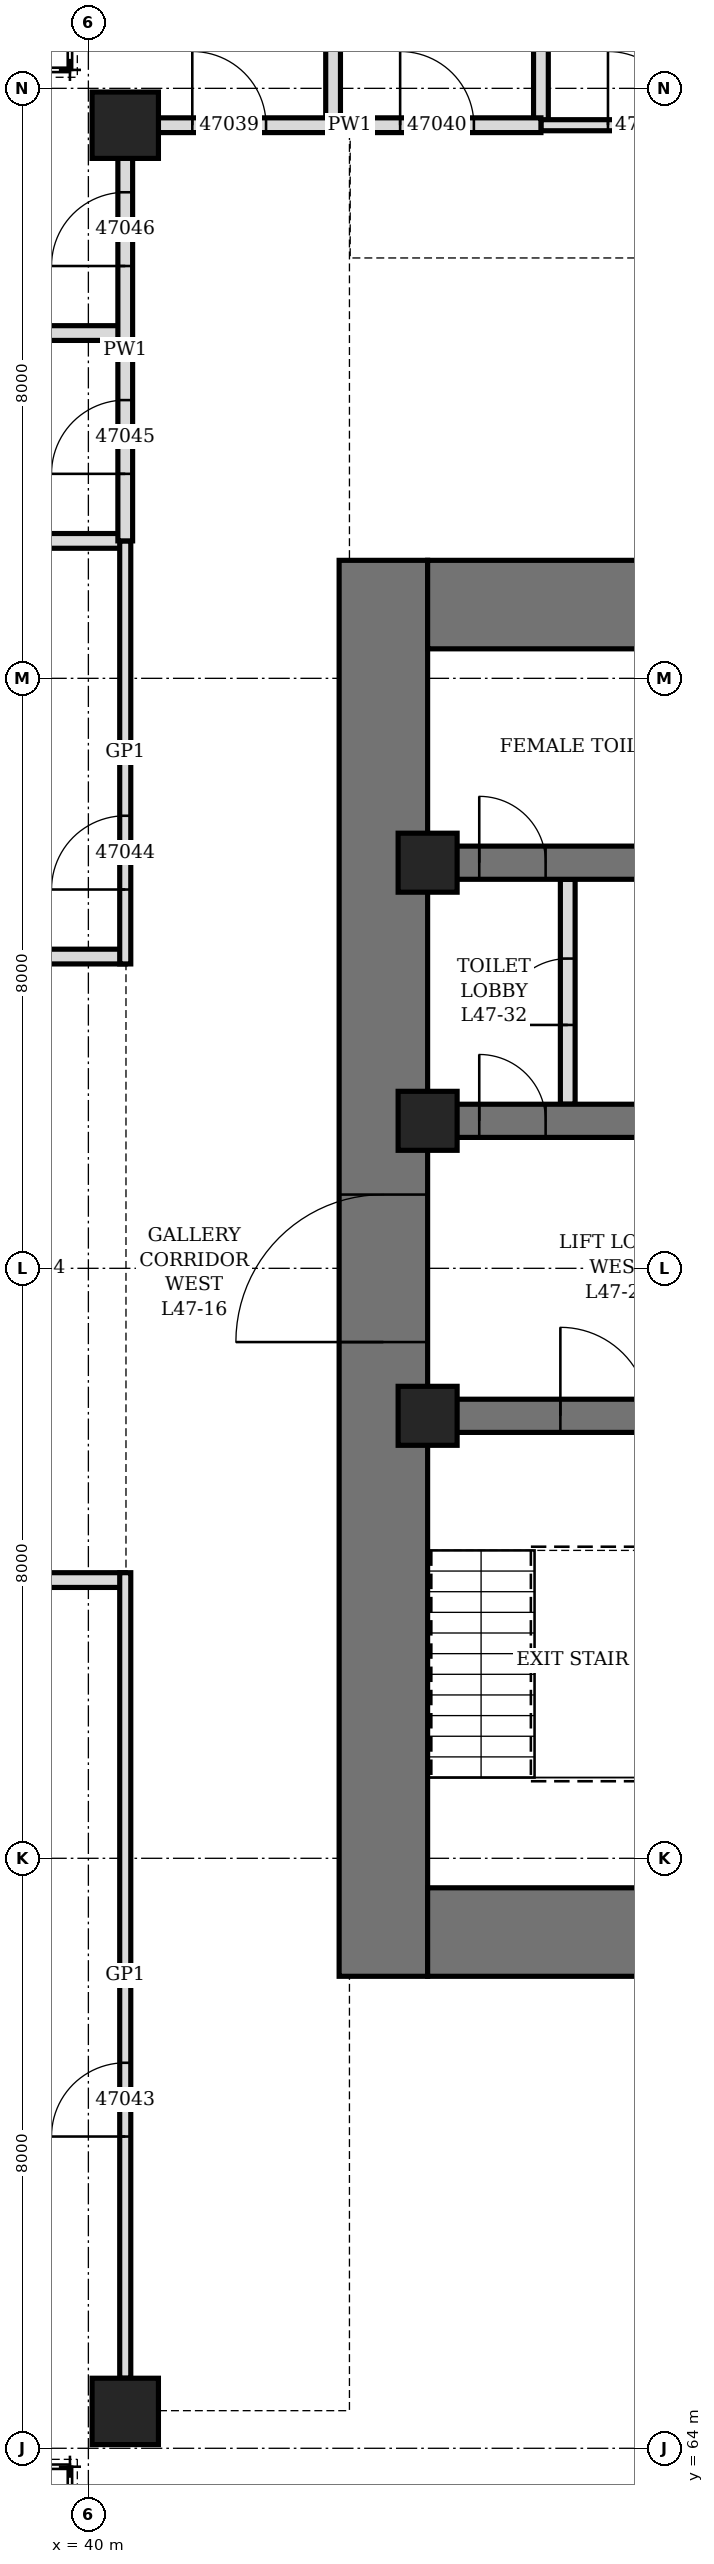
"""IFC4 building model, lengths in metres.
Left out: names, types, materials, properties, quantities, classifications, styles, units other than length and angle.
Written with IfcOpenShell. Run it as: python <this file> out.ifc"""

import sys

from ifc_helpers import new_model, si_unit, direction, frame, frame_2d, origin, origin_2d, place, context, subcontext, project, spatial, rectangle, hollow_rectangle, extrude, element, fill, save


model = new_model("IFC4")
c1 = context("Model", 3, precision=1e-05, world=origin(), true_north=direction((0.0, 1.0)))
c2 = subcontext(c1, "Body", "Model", "MODEL_VIEW")
j1 = project(units=[si_unit("LENGTHUNIT", "METRE"), si_unit("PLANEANGLEUNIT", "RADIAN")], contexts=[c1])
p1 = place(None, origin())
s1 = spatial("IfcSite", under=j1, at=p1, CompositionType="ELEMENT")
p2 = place(p1, origin())
s2 = spatial("IfcBuilding", under=s1, at=p2, CompositionType="ELEMENT")
p3 = place(p2, frame((0.0, 0.0, 210.7)))
s3 = spatial("IfcBuildingStorey", under=s2, at=p3, CompositionType="ELEMENT", Elevation=210.7)
for number, where, z_axis, x_axis in (
    (1, (40.5, 95.5, 0.0), (0.0, 0.0, 1.0), (1.0, 0.0, 0.0)),
    (2, (40.5, 64.5, 0.0), (0.0, 0.0, 1.0), (0.0, 1.0, 0.0)),
):
    element("IfcColumn", number, at=place(p3, frame(where, z_axis=z_axis, x_axis=x_axis)), inside=s3, PredefinedType="COLUMN", context=c2, shape_type="SweptSolid", body=[
        extrude(hollow_rectangle(XDim=0.9, YDim=0.9, WallThickness=0.12, at=origin_2d()), origin(), (0.0, 0.0, 1.0), 4.2),
    ])
p4 = place(p3, frame((44.0, 70.4, 0.0), z_axis=(0.0, 0.0, 1.0), x_axis=(0.0, 1.0, 0.0)))
e3 = element("IfcWall", 3, at=p4, inside=s3, PredefinedType="SHEAR", context=c2, shape_type="SweptSolid", body=[
    extrude(rectangle(XDim=19.2, YDim=1.2, at=frame_2d((9.6, 0.0))), origin(), (0.0, 0.0, 1.0), 4.2),
])
p5 = place(p4, frame((8.6, 0.0, 0.0)))
e4 = element("IfcOpeningElement", 4, at=p5, cuts=e3, PredefinedType="OPENING", context=c2, shape_type="SweptSolid", body=[
    extrude(rectangle(XDim=2.0, YDim=2.4, at=frame_2d((1.0, 1.2))), frame((0.0, 0.61, 0.0), z_axis=(0.0, -1.0, 0.0), x_axis=(1.0, 0.0, 0.0)), (0.0, 0.0, 1.0), 1.22),
])
p6 = place(p3, frame((44.6, 71.0, 0.0), z_axis=(0.0, 0.0, 1.0), x_axis=(1.0, 0.0, 0.0)))
e5 = element("IfcWall", 5, at=p6, inside=s3, PredefinedType="SHEAR", context=c2, shape_type="SweptSolid", body=[
    extrude(rectangle(XDim=22.8, YDim=1.2, at=frame_2d((11.4, 0.0))), origin(), (0.0, 0.0, 1.0), 4.2),
])
p7 = place(p6, frame((6.35, 0.0, 0.0)))
e6 = element("IfcOpeningElement", 6, at=p7, cuts=e5, PredefinedType="OPENING", context=c2, shape_type="SweptSolid", body=[
    extrude(rectangle(XDim=1.1, YDim=2.2, at=frame_2d((0.55, 1.1))), frame((0.0, 0.61, 0.0), z_axis=(0.0, -1.0, 0.0), x_axis=(1.0, 0.0, 0.0)), (0.0, 0.0, 1.0), 1.22),
])
p8 = place(p6, frame((9.35, 0.0, 0.0)))
e7 = element("IfcOpeningElement", 7, at=p8, cuts=e5, PredefinedType="OPENING", context=c2, shape_type="SweptSolid", body=[
    extrude(rectangle(XDim=1.1, YDim=2.2, at=frame_2d((0.55, 1.1))), frame((0.0, 0.61, 0.0), z_axis=(0.0, -1.0, 0.0), x_axis=(1.0, 0.0, 0.0)), (0.0, 0.0, 1.0), 1.22),
])
p9 = place(p6, frame((12.35, 0.0, 0.0)))
e8 = element("IfcOpeningElement", 8, at=p9, cuts=e5, PredefinedType="OPENING", context=c2, shape_type="SweptSolid", body=[
    extrude(rectangle(XDim=1.1, YDim=2.2, at=frame_2d((0.55, 1.1))), frame((0.0, 0.61, 0.0), z_axis=(0.0, -1.0, 0.0), x_axis=(1.0, 0.0, 0.0)), (0.0, 0.0, 1.0), 1.22),
])
p10 = place(p6, frame((15.35, 0.0, 0.0)))
e9 = element("IfcOpeningElement", 9, at=p10, cuts=e5, PredefinedType="OPENING", context=c2, shape_type="SweptSolid", body=[
    extrude(rectangle(XDim=1.1, YDim=2.2, at=frame_2d((0.55, 1.1))), frame((0.0, 0.61, 0.0), z_axis=(0.0, -1.0, 0.0), x_axis=(1.0, 0.0, 0.0)), (0.0, 0.0, 1.0), 1.22),
])
p11 = place(p3, frame((44.6, 89.0, 0.0), z_axis=(0.0, 0.0, 1.0), x_axis=(1.0, 0.0, 0.0)))
e10 = element("IfcWall", 10, at=p11, inside=s3, PredefinedType="SHEAR", context=c2, shape_type="SweptSolid", body=[
    extrude(rectangle(XDim=22.8, YDim=1.2, at=frame_2d((11.4, 0.0))), origin(), (0.0, 0.0, 1.0), 4.2),
])
p12 = place(p11, frame((6.525, 0.0, 0.0)))
e11 = element("IfcOpeningElement", 11, at=p12, cuts=e10, PredefinedType="OPENING", context=c2, shape_type="SweptSolid", body=[
    extrude(rectangle(XDim=1.0, YDim=2.1, at=frame_2d((0.5, 1.05))), frame((0.0, 0.61, 0.0), z_axis=(0.0, -1.0, 0.0), x_axis=(1.0, 0.0, 0.0)), (0.0, 0.0, 1.0), 1.22),
])
p13 = place(p11, frame((9.45, 0.0, 0.0)))
e12 = element("IfcOpeningElement", 12, at=p13, cuts=e10, PredefinedType="OPENING", context=c2, shape_type="SweptSolid", body=[
    extrude(rectangle(XDim=0.9, YDim=2.1, at=frame_2d((0.45, 1.05))), frame((0.0, 0.61, 0.0), z_axis=(0.0, -1.0, 0.0), x_axis=(1.0, 0.0, 0.0)), (0.0, 0.0, 1.0), 1.22),
])
p14 = place(p11, frame((12.025, 0.0, 0.0)))
e13 = element("IfcOpeningElement", 13, at=p14, cuts=e10, PredefinedType="OPENING", context=c2, shape_type="SweptSolid", body=[
    extrude(rectangle(XDim=0.9, YDim=2.1, at=frame_2d((0.45, 1.05))), frame((0.0, 0.61, 0.0), z_axis=(0.0, -1.0, 0.0), x_axis=(1.0, 0.0, 0.0)), (0.0, 0.0, 1.0), 1.22),
])
p15 = place(p11, frame((13.962, 0.0, 0.0)))
e14 = element("IfcOpeningElement", 14, at=p15, cuts=e10, PredefinedType="OPENING", context=c2, shape_type="SweptSolid", body=[
    extrude(rectangle(XDim=0.9, YDim=2.1, at=frame_2d((0.45, 1.05))), frame((0.0, 0.61, 0.0), z_axis=(0.0, -1.0, 0.0), x_axis=(1.0, 0.0, 0.0)), (0.0, 0.0, 1.0), 1.22),
])
p16 = place(p3, frame((44.6, 78.0, 0.0), z_axis=(0.0, 0.0, 1.0), x_axis=(1.0, 0.0, 0.0)))
e15 = element("IfcWall", 15, at=p16, inside=s3, PredefinedType="SHEAR", context=c2, shape_type="SweptSolid", body=[
    extrude(rectangle(XDim=5.175, YDim=0.45, at=frame_2d((2.587, 0.0))), origin(), (0.0, 0.0, 1.0), 4.2),
])
p17 = place(p16, frame((1.8, 0.0, 0.0)))
e16 = element("IfcOpeningElement", 16, at=p17, cuts=e15, PredefinedType="OPENING", context=c2, shape_type="SweptSolid", body=[
    extrude(rectangle(XDim=1.2, YDim=2.1, at=frame_2d((0.6, 1.05))), frame((0.0, 0.235, 0.0), z_axis=(0.0, -1.0, 0.0), x_axis=(1.0, 0.0, 0.0)), (0.0, 0.0, 1.0), 0.47),
])
p18 = place(p3, frame((44.6, 82.0, 0.0), z_axis=(0.0, 0.0, 1.0), x_axis=(1.0, 0.0, 0.0)))
e17 = element("IfcWall", 17, at=p18, inside=s3, PredefinedType="SHEAR", context=c2, shape_type="SweptSolid", body=[
    extrude(rectangle(XDim=5.175, YDim=0.45, at=frame_2d((2.587, 0.0))), origin(), (0.0, 0.0, 1.0), 4.2),
])
p19 = place(p18, frame((0.7, 0.0, 0.0)))
e18 = element("IfcOpeningElement", 18, at=p19, cuts=e17, PredefinedType="OPENING", context=c2, shape_type="SweptSolid", body=[
    extrude(rectangle(XDim=0.9, YDim=2.1, at=frame_2d((0.45, 1.05))), frame((0.0, 0.235, 0.0), z_axis=(0.0, -1.0, 0.0), x_axis=(1.0, 0.0, 0.0)), (0.0, 0.0, 1.0), 0.47),
])
p20 = place(p3, frame((44.6, 85.5, 0.0), z_axis=(0.0, 0.0, 1.0), x_axis=(1.0, 0.0, 0.0)))
e19 = element("IfcWall", 19, at=p20, inside=s3, PredefinedType="SHEAR", context=c2, shape_type="SweptSolid", body=[
    extrude(rectangle(XDim=5.175, YDim=0.45, at=frame_2d((2.587, 0.0))), origin(), (0.0, 0.0, 1.0), 4.2),
])
p21 = place(p20, frame((0.7, 0.0, 0.0)))
e20 = element("IfcOpeningElement", 20, at=p21, cuts=e19, PredefinedType="OPENING", context=c2, shape_type="SweptSolid", body=[
    extrude(rectangle(XDim=0.9, YDim=2.1, at=frame_2d((0.45, 1.05))), frame((0.0, 0.235, 0.0), z_axis=(0.0, -1.0, 0.0), x_axis=(1.0, 0.0, 0.0)), (0.0, 0.0, 1.0), 0.47),
])
for number, where, z_axis, x_axis in (
    (21, (44.6, 78.0, 0.0), (0.0, 0.0, 1.0), (1.0, 0.0, 0.0)),
    (22, (44.6, 82.0, 0.0), (0.0, 0.0, 1.0), (1.0, 0.0, 0.0)),
    (23, (44.6, 85.5, 0.0), (0.0, 0.0, 1.0), (1.0, 0.0, 0.0)),
):
    element("IfcColumn", number, at=place(p3, frame(where, z_axis=z_axis, x_axis=x_axis)), inside=s3, PredefinedType="COLUMN", context=c2, shape_type="SweptSolid", body=[
        extrude(hollow_rectangle(XDim=0.8, YDim=0.8, WallThickness=0.1, at=origin_2d()), origin(), (0.0, 0.0, 1.0), 4.2),
    ])
p22 = place(p3, frame((46.5, 82.225, 0.0), z_axis=(0.0, 0.0, 1.0), x_axis=(0.0, 1.0, 0.0)))
e24 = element("IfcWall", 24, at=p22, inside=s3, PredefinedType="PARTITIONING", context=c2, shape_type="SweptSolid", body=[
    extrude(rectangle(XDim=3.05, YDim=0.2, at=frame_2d((1.525, 0.0))), origin(), (0.0, 0.0, 1.0), 4.04),
])
p23 = place(p22, frame((1.075, 0.0, 0.0)))
e25 = element("IfcOpeningElement", 25, at=p23, cuts=e24, PredefinedType="OPENING", context=c2, shape_type="SweptSolid", body=[
    extrude(rectangle(XDim=0.9, YDim=2.1, at=frame_2d((0.45, 1.05))), frame((0.0, 0.11, 0.0), z_axis=(0.0, -1.0, 0.0), x_axis=(1.0, 0.0, 0.0)), (0.0, 0.0, 1.0), 0.22),
])
for number, where, z_axis, x_axis in (
    (26, (43.318, 95.5, 0.0), (0.0, 0.0, 1.0), (0.0, 1.0, 0.0)),
    (27, (46.136, 95.5, 0.0), (0.0, 0.0, 1.0), (0.0, 1.0, 0.0)),
    (28, (35.45, 75.773, 0.0), (0.0, 0.0, 1.0), (1.0, 0.0, 0.0)),
    (29, (35.45, 84.227, 0.0), (0.0, 0.0, 1.0), (1.0, 0.0, 0.0)),
    (30, (35.45, 89.864, 0.0), (0.0, 0.0, 1.0), (1.0, 0.0, 0.0)),
    (31, (35.45, 92.682, 0.0), (0.0, 0.0, 1.0), (1.0, 0.0, 0.0)),
):
    element("IfcWall", number, at=place(p3, frame(where, z_axis=z_axis, x_axis=x_axis)), inside=s3, PredefinedType="PARTITIONING", context=c2, shape_type="SweptSolid", body=[
        extrude(rectangle(XDim=5.05, YDim=0.2, at=frame_2d((2.525, 0.0))), origin(), (0.0, 0.0, 1.0), 3.428),
    ])
p24 = place(p3, frame((46.136, 95.5, 0.0), z_axis=(0.0, 0.0, 1.0), x_axis=(1.0, 0.0, 0.0)))
e32 = element("IfcWall", 32, at=p24, inside=s3, PredefinedType="PARTITIONING", context=c2, shape_type="SweptSolid", body=[
    extrude(rectangle(XDim=5.736, YDim=0.15, at=frame_2d((2.868, 0.0))), origin(), (0.0, 0.0, 1.0), 4.04),
])
p25 = place(p24, frame((0.909, 0.0, 0.0)))
e33 = element("IfcOpeningElement", 33, at=p25, cuts=e32, PredefinedType="OPENING", context=c2, shape_type="SweptSolid", body=[
    extrude(rectangle(XDim=1.0, YDim=2.1, at=frame_2d((0.5, 1.05))), frame((0.0, 0.085, 0.0), z_axis=(0.0, -1.0, 0.0), x_axis=(1.0, 0.0, 0.0)), (0.0, 0.0, 1.0), 0.17),
])
p26 = place(p3, frame((40.95, 95.5, 0.0), z_axis=(0.0, 0.0, 1.0), x_axis=(1.0, 0.0, 0.0)))
e34 = element("IfcWall", 34, at=p26, inside=s3, PredefinedType="PARTITIONING", context=c2, shape_type="SweptSolid", body=[
    extrude(rectangle(XDim=5.187, YDim=0.2, at=frame_2d((2.593, 0.0))), origin(), (0.0, 0.0, 1.0), 4.04),
])
p27 = place(p26, frame((0.459, 0.0, 0.0)))
e35 = element("IfcOpeningElement", 35, at=p27, cuts=e34, PredefinedType="OPENING", context=c2, shape_type="SweptSolid", body=[
    extrude(rectangle(XDim=1.0, YDim=2.1, at=frame_2d((0.5, 1.05))), frame((0.0, 0.11, 0.0), z_axis=(0.0, -1.0, 0.0), x_axis=(1.0, 0.0, 0.0)), (0.0, 0.0, 1.0), 0.22),
])
p28 = place(p26, frame((3.277, 0.0, 0.0)))
e36 = element("IfcOpeningElement", 36, at=p28, cuts=e34, PredefinedType="OPENING", context=c2, shape_type="SweptSolid", body=[
    extrude(rectangle(XDim=1.0, YDim=2.1, at=frame_2d((0.5, 1.05))), frame((0.0, 0.11, 0.0), z_axis=(0.0, -1.0, 0.0), x_axis=(1.0, 0.0, 0.0)), (0.0, 0.0, 1.0), 0.22),
])
p29 = place(p3, frame((40.5, 64.95, 0.0), z_axis=(0.0, 0.0, 1.0), x_axis=(0.0, 1.0, 0.0)))
e37 = element("IfcWall", 37, at=p29, inside=s3, PredefinedType="PARTITIONING", context=c2, shape_type="SweptSolid", body=[
    extrude(rectangle(XDim=10.923, YDim=0.15, at=frame_2d((5.461, 0.0))), origin(), (0.0, 0.0, 1.0), 4.04),
])
p30 = place(p29, frame((3.277, 0.0, 0.0)))
e38 = element("IfcOpeningElement", 38, at=p30, cuts=e37, PredefinedType="OPENING", context=c2, shape_type="SweptSolid", body=[
    extrude(rectangle(XDim=1.0, YDim=2.4, at=frame_2d((0.5, 1.2))), frame((0.0, 0.085, 0.0), z_axis=(0.0, -1.0, 0.0), x_axis=(1.0, 0.0, 0.0)), (0.0, 0.0, 1.0), 0.17),
])
p31 = place(p3, frame((40.5, 84.127, 0.0), z_axis=(0.0, 0.0, 1.0), x_axis=(0.0, 1.0, 0.0)))
e39 = element("IfcWall", 39, at=p31, inside=s3, PredefinedType="PARTITIONING", context=c2, shape_type="SweptSolid", body=[
    extrude(rectangle(XDim=5.736, YDim=0.15, at=frame_2d((2.868, 0.0))), origin(), (0.0, 0.0, 1.0), 4.04),
])
p32 = place(p31, frame((1.009, 0.0, 0.0)))
e40 = element("IfcOpeningElement", 40, at=p32, cuts=e39, PredefinedType="OPENING", context=c2, shape_type="SweptSolid", body=[
    extrude(rectangle(XDim=1.0, YDim=2.4, at=frame_2d((0.5, 1.2))), frame((0.0, 0.085, 0.0), z_axis=(0.0, -1.0, 0.0), x_axis=(1.0, 0.0, 0.0)), (0.0, 0.0, 1.0), 0.17),
])
p33 = place(p3, frame((40.5, 89.864, 0.0), z_axis=(0.0, 0.0, 1.0), x_axis=(0.0, 1.0, 0.0)))
e41 = element("IfcWall", 41, at=p33, inside=s3, PredefinedType="PARTITIONING", context=c2, shape_type="SweptSolid", body=[
    extrude(rectangle(XDim=5.187, YDim=0.2, at=frame_2d((2.593, 0.0))), origin(), (0.0, 0.0, 1.0), 4.04),
])
p34 = place(p33, frame((0.909, 0.0, 0.0)))
e42 = element("IfcOpeningElement", 42, at=p34, cuts=e41, PredefinedType="OPENING", context=c2, shape_type="SweptSolid", body=[
    extrude(rectangle(XDim=1.0, YDim=2.1, at=frame_2d((0.5, 1.05))), frame((0.0, 0.11, 0.0), z_axis=(0.0, -1.0, 0.0), x_axis=(1.0, 0.0, 0.0)), (0.0, 0.0, 1.0), 0.22),
])
p35 = place(p33, frame((3.727, 0.0, 0.0)))
e43 = element("IfcOpeningElement", 43, at=p35, cuts=e41, PredefinedType="OPENING", context=c2, shape_type="SweptSolid", body=[
    extrude(rectangle(XDim=1.0, YDim=2.1, at=frame_2d((0.5, 1.05))), frame((0.0, 0.11, 0.0), z_axis=(0.0, -1.0, 0.0), x_axis=(1.0, 0.0, 0.0)), (0.0, 0.0, 1.0), 0.22),
])
p36 = place(p19, origin())
e44 = element("IfcDoor", 44, at=p36, inside=s3, OperationType="SINGLE_SWING_LEFT", PredefinedType="DOOR", context=c2, shape_type="SweptSolid", body=[
    extrude(rectangle(XDim=0.9, YDim=2.1, at=frame_2d((0.45, 1.05))), frame((0.0, 0.225, 0.0), z_axis=(0.0, -1.0, 0.0), x_axis=(1.0, 0.0, 0.0)), (0.0, 0.0, 1.0), 0.449),
])
fill(e18, e44)
p37 = place(p23, origin())
e45 = element("IfcDoor", 45, at=p37, inside=s3, OperationType="SINGLE_SWING_RIGHT", PredefinedType="DOOR", context=c2, shape_type="SweptSolid", body=[
    extrude(rectangle(XDim=0.9, YDim=2.1, at=frame_2d((0.45, 1.05))), frame((0.0, 0.1, 0.0), z_axis=(0.0, -1.0, 0.0), x_axis=(1.0, 0.0, 0.0)), (0.0, 0.0, 1.0), 0.199),
])
fill(e25, e45)
p38 = place(p21, origin())
e46 = element("IfcDoor", 46, at=p38, inside=s3, OperationType="SINGLE_SWING_RIGHT", PredefinedType="DOOR", context=c2, shape_type="SweptSolid", body=[
    extrude(rectangle(XDim=0.9, YDim=2.1, at=frame_2d((0.45, 1.05))), frame((0.0, 0.225, 0.0), z_axis=(0.0, -1.0, 0.0), x_axis=(1.0, 0.0, 0.0)), (0.0, 0.0, 1.0), 0.449),
])
fill(e20, e46)
p39 = place(p17, origin())
e47 = element("IfcDoor", 47, at=p39, inside=s3, OperationType="SINGLE_SWING_LEFT", PredefinedType="DOOR", context=c2, shape_type="SweptSolid", body=[
    extrude(rectangle(XDim=1.2, YDim=2.1, at=frame_2d((0.6, 1.05))), frame((0.0, 0.225, 0.0), z_axis=(0.0, -1.0, 0.0), x_axis=(1.0, 0.0, 0.0)), (0.0, 0.0, 1.0), 0.449),
])
fill(e16, e47)
p40 = place(p5, origin())
e48 = element("IfcDoor", 48, at=p40, inside=s3, OperationType="DOUBLE_DOOR_SINGLE_SWING", PredefinedType="DOOR", context=c2, shape_type="SweptSolid", body=[
    extrude(rectangle(XDim=2.0, YDim=2.4, at=frame_2d((1.0, 1.2))), frame((0.0, 0.35, 0.0), z_axis=(0.0, -1.0, 0.0), x_axis=(1.0, 0.0, 0.0)), (0.0, 0.0, 1.0), 0.7),
])
fill(e4, e48)
p41 = place(p27, origin())
e49 = element("IfcDoor", 49, at=p41, inside=s3, OperationType="SINGLE_SWING_LEFT", PredefinedType="DOOR", context=c2, shape_type="SweptSolid", body=[
    extrude(rectangle(XDim=1.0, YDim=2.1, at=frame_2d((0.5, 1.05))), frame((0.0, 0.1, 0.0), z_axis=(0.0, -1.0, 0.0), x_axis=(1.0, 0.0, 0.0)), (0.0, 0.0, 1.0), 0.199),
])
fill(e35, e49)
p42 = place(p28, origin())
e50 = element("IfcDoor", 50, at=p42, inside=s3, OperationType="SINGLE_SWING_LEFT", PredefinedType="DOOR", context=c2, shape_type="SweptSolid", body=[
    extrude(rectangle(XDim=1.0, YDim=2.1, at=frame_2d((0.5, 1.05))), frame((0.0, 0.1, 0.0), z_axis=(0.0, -1.0, 0.0), x_axis=(1.0, 0.0, 0.0)), (0.0, 0.0, 1.0), 0.199),
])
fill(e36, e50)
p43 = place(p25, origin())
e51 = element("IfcDoor", 51, at=p43, inside=s3, OperationType="SINGLE_SWING_LEFT", PredefinedType="DOOR", context=c2, shape_type="SweptSolid", body=[
    extrude(rectangle(XDim=1.0, YDim=2.1, at=frame_2d((0.5, 1.05))), frame((0.0, 0.075, 0.0), z_axis=(0.0, -1.0, 0.0), x_axis=(1.0, 0.0, 0.0)), (0.0, 0.0, 1.0), 0.149),
])
fill(e33, e51)
p44 = place(p30, origin())
e52 = element("IfcDoor", 52, at=p44, inside=s3, OperationType="SINGLE_SWING_RIGHT", PredefinedType="DOOR", context=c2, shape_type="SweptSolid", body=[
    extrude(rectangle(XDim=1.0, YDim=2.4, at=frame_2d((0.5, 1.2))), frame((0.0, 0.075, 0.0), z_axis=(0.0, -1.0, 0.0), x_axis=(1.0, 0.0, 0.0)), (0.0, 0.0, 1.0), 0.149),
])
fill(e38, e52)
p45 = place(p32, origin())
e53 = element("IfcDoor", 53, at=p45, inside=s3, OperationType="SINGLE_SWING_RIGHT", PredefinedType="DOOR", context=c2, shape_type="SweptSolid", body=[
    extrude(rectangle(XDim=1.0, YDim=2.4, at=frame_2d((0.5, 1.2))), frame((0.0, 0.075, 0.0), z_axis=(0.0, -1.0, 0.0), x_axis=(1.0, 0.0, 0.0)), (0.0, 0.0, 1.0), 0.149),
])
fill(e40, e53)
p46 = place(p34, origin())
e54 = element("IfcDoor", 54, at=p46, inside=s3, OperationType="SINGLE_SWING_LEFT", PredefinedType="DOOR", context=c2, shape_type="SweptSolid", body=[
    extrude(rectangle(XDim=1.0, YDim=2.1, at=frame_2d((0.5, 1.05))), frame((0.0, 0.1, 0.0), z_axis=(0.0, -1.0, 0.0), x_axis=(1.0, 0.0, 0.0)), (0.0, 0.0, 1.0), 0.199),
])
fill(e42, e54)
p47 = place(p35, origin())
e55 = element("IfcDoor", 55, at=p47, inside=s3, OperationType="SINGLE_SWING_LEFT", PredefinedType="DOOR", context=c2, shape_type="SweptSolid", body=[
    extrude(rectangle(XDim=1.0, YDim=2.1, at=frame_2d((0.5, 1.05))), frame((0.0, 0.1, 0.0), z_axis=(0.0, -1.0, 0.0), x_axis=(1.0, 0.0, 0.0)), (0.0, 0.0, 1.0), 0.199),
])
fill(e43, e55)
save(model, sys.argv[1])
